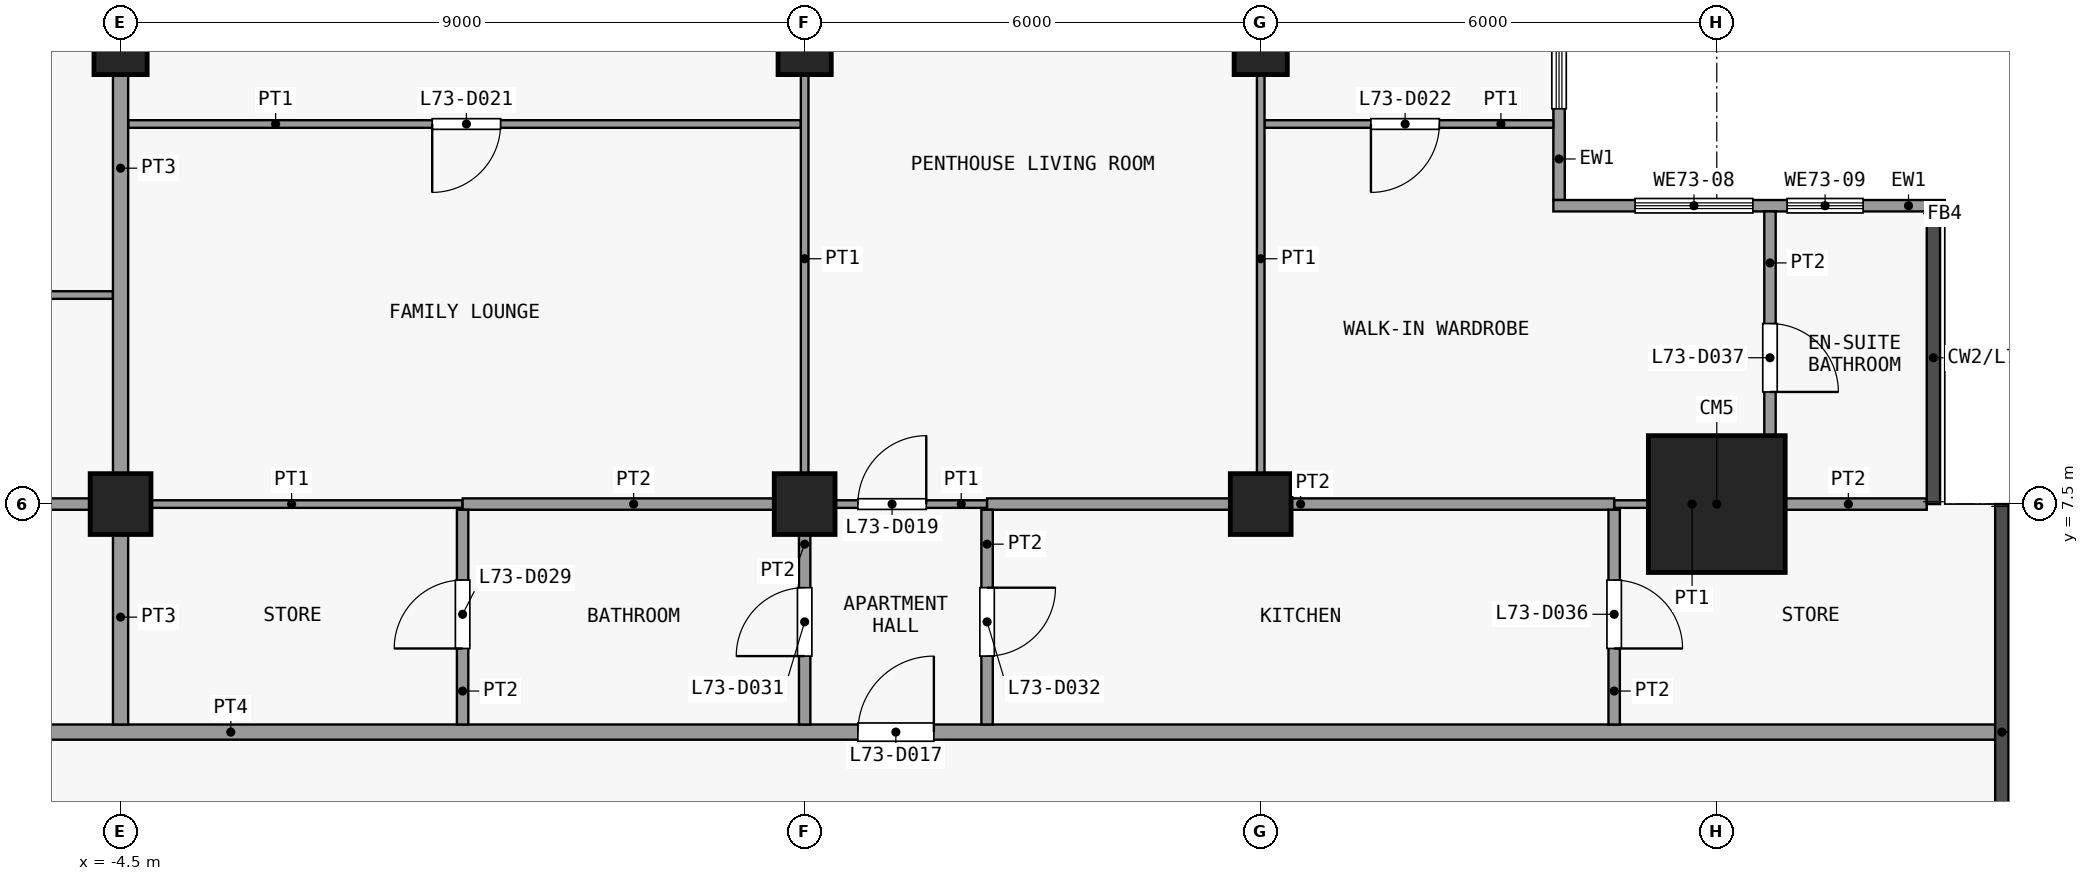
"""IFC4 building model, lengths in metres.
Left out: names, types, materials, properties, quantities, classifications, styles, units other than length and angle.
Written with IfcOpenShell. Run it as: python <this file> out.ifc"""

import sys

from ifc_helpers import new_model, si_unit, direction, frame, frame_2d, origin, origin_2d, place, context, subcontext, project, spatial, rectangle, extrude, element, fill, save


model = new_model("IFC4")
c1 = context("Model", 3, precision=1e-05, world=origin(), true_north=direction((0.0, 1.0)))
c2 = subcontext(c1, "Body", "Model", "MODEL_VIEW")
j1 = project(units=[si_unit("LENGTHUNIT", "METRE"), si_unit("PLANEANGLEUNIT", "RADIAN")], contexts=[c1])
p1 = place(None, origin())
s1 = spatial("IfcSite", under=j1, at=p1, CompositionType="ELEMENT")
p2 = place(p1, origin())
s2 = spatial("IfcBuilding", under=s1, at=p2, CompositionType="ELEMENT")
p3 = place(p2, frame((0.0, 0.0, 287.9)))
s3 = spatial("IfcBuildingStorey", under=s2, at=p3, CompositionType="ELEMENT", Elevation=287.9)
p4 = place(p3, frame((-4.5, 7.5, 0.0), z_axis=(0.0, 0.0, 1.0), x_axis=(1.0, 0.0, 0.0)))
e1 = element("IfcColumn", 1, at=p4, inside=s3, PredefinedType="COLUMN", context=c2, shape_type="SweptSolid", body=[
    extrude(rectangle(XDim=0.8, YDim=0.8, at=origin_2d()), origin(), (0.0, 0.0, 1.0), 3.6),
])
p5 = place(p3, frame((-4.5, 13.5, 0.0), z_axis=(0.0, 0.0, 1.0), x_axis=(1.0, 0.0, 0.0)))
e2 = element("IfcColumn", 2, at=p5, inside=s3, PredefinedType="COLUMN", context=c2, shape_type="SweptSolid", body=[
    extrude(rectangle(XDim=0.7, YDim=0.7, at=origin_2d()), origin(), (0.0, 0.0, 1.0), 3.6),
])
p6 = place(p3, frame((4.5, 7.5, 0.0), z_axis=(0.0, 0.0, 1.0), x_axis=(1.0, 0.0, 0.0)))
e3 = element("IfcColumn", 3, at=p6, inside=s3, PredefinedType="COLUMN", context=c2, shape_type="SweptSolid", body=[
    extrude(rectangle(XDim=0.8, YDim=0.8, at=origin_2d()), origin(), (0.0, 0.0, 1.0), 3.6),
])
p7 = place(p3, frame((4.5, 13.5, 0.0), z_axis=(0.0, 0.0, 1.0), x_axis=(1.0, 0.0, 0.0)))
e4 = element("IfcColumn", 4, at=p7, inside=s3, PredefinedType="COLUMN", context=c2, shape_type="SweptSolid", body=[
    extrude(rectangle(XDim=0.7, YDim=0.7, at=origin_2d()), origin(), (0.0, 0.0, 1.0), 3.6),
])
p8 = place(p3, frame((10.5, 7.5, 0.0), z_axis=(0.0, 0.0, 1.0), x_axis=(1.0, 0.0, 0.0)))
e5 = element("IfcColumn", 5, at=p8, inside=s3, PredefinedType="COLUMN", context=c2, shape_type="SweptSolid", body=[
    extrude(rectangle(XDim=0.8, YDim=0.8, at=origin_2d()), origin(), (0.0, 0.0, 1.0), 3.6),
])
p9 = place(p3, frame((10.5, 13.5, 0.0), z_axis=(0.0, 0.0, 1.0), x_axis=(1.0, 0.0, 0.0)))
e6 = element("IfcColumn", 6, at=p9, inside=s3, PredefinedType="COLUMN", context=c2, shape_type="SweptSolid", body=[
    extrude(rectangle(XDim=0.7, YDim=0.7, at=origin_2d()), origin(), (0.0, 0.0, 1.0), 3.6),
])
p10 = place(p3, frame((16.5, 7.5, 0.0), z_axis=(0.0, 0.0, 1.0), x_axis=(1.0, 0.0, 0.0)))
e7 = element("IfcColumn", 7, at=p10, inside=s3, PredefinedType="COLUMN", context=c2, shape_type="SweptSolid", body=[
    extrude(rectangle(XDim=1.8, YDim=1.8, at=origin_2d()), origin(), (0.0, 0.0, 1.0), 3.6),
])
p11 = place(p3, frame((14.425, 16.262, 0.0), z_axis=(0.0, 0.0, 1.0), x_axis=(0.0, -1.0, 0.0)))
e8 = element("IfcWall", 8, at=p11, inside=s3, PredefinedType="SOLIDWALL", context=c2, shape_type="SweptSolid", body=[
    extrude(rectangle(XDim=4.762, YDim=0.15, at=frame_2d((2.381, 0.0))), origin(), (0.0, 0.0, 1.0), 3.3),
])
p12 = place(p11, frame((0.881, 0.0, 0.9)))
e9 = element("IfcOpeningElement", 9, at=p12, cuts=e8, PredefinedType="OPENING", context=c2, shape_type="SweptSolid", body=[
    extrude(rectangle(XDim=2.681, YDim=2.4, at=frame_2d((1.34, 1.2))), frame((0.0, 0.085, 0.0), z_axis=(0.0, -1.0, 0.0), x_axis=(1.0, 0.0, 0.0)), (0.0, 0.0, 1.0), 0.17),
])
p13 = place(p3, frame((14.35, 11.425, 0.0), z_axis=(0.0, 0.0, 1.0), x_axis=(1.0, 0.0, 0.0)))
e10 = element("IfcWall", 10, at=p13, inside=s3, PredefinedType="SOLIDWALL", context=c2, shape_type="SweptSolid", body=[
    extrude(rectangle(XDim=5.15, YDim=0.15, at=frame_2d((2.575, 0.0))), origin(), (0.0, 0.0, 1.0), 3.3),
])
p14 = place(p13, frame((1.075, 0.0, 0.9)))
e11 = element("IfcOpeningElement", 11, at=p14, cuts=e10, PredefinedType="OPENING", context=c2, shape_type="SweptSolid", body=[
    extrude(rectangle(XDim=1.55, YDim=2.4, at=frame_2d((0.775, 1.2))), frame((0.0, 0.085, 0.0), z_axis=(0.0, -1.0, 0.0), x_axis=(1.0, 0.0, 0.0)), (0.0, 0.0, 1.0), 0.17),
])
p15 = place(p13, frame((3.075, 0.0, 0.9)))
e12 = element("IfcOpeningElement", 12, at=p15, cuts=e10, PredefinedType="OPENING", context=c2, shape_type="SweptSolid", body=[
    extrude(rectangle(XDim=1.0, YDim=2.4, at=frame_2d((0.5, 1.2))), frame((0.0, 0.085, 0.0), z_axis=(0.0, -1.0, 0.0), x_axis=(1.0, 0.0, 0.0)), (0.0, 0.0, 1.0), 0.17),
])
p16 = place(p3, frame((-19.35, 4.5, 0.0), z_axis=(0.0, 0.0, 1.0), x_axis=(1.0, 0.0, 0.0)))
e13 = element("IfcWall", 13, at=p16, inside=s3, PredefinedType="PARTITIONING", context=c2, shape_type="SweptSolid", body=[
    extrude(rectangle(XDim=39.6, YDim=0.2, at=frame_2d((19.8, 0.0))), origin(), (0.0, 0.0, 1.0), 3.3),
])
p17 = place(p16, frame((7.05, 0.0, 0.0)))
e14 = element("IfcOpeningElement", 14, at=p17, cuts=e13, PredefinedType="OPENING", context=c2, shape_type="SweptSolid", body=[
    extrude(rectangle(XDim=1.0, YDim=2.1, at=frame_2d((0.5, 1.05))), frame((0.0, 0.11, 0.0), z_axis=(0.0, -1.0, 0.0), x_axis=(1.0, 0.0, 0.0)), (0.0, 0.0, 1.0), 0.22),
])
p18 = place(p16, frame((24.55, 0.0, 0.0)))
e15 = element("IfcOpeningElement", 15, at=p18, cuts=e13, PredefinedType="OPENING", context=c2, shape_type="SweptSolid", body=[
    extrude(rectangle(XDim=1.0, YDim=2.1, at=frame_2d((0.5, 1.05))), frame((0.0, 0.11, 0.0), z_axis=(0.0, -1.0, 0.0), x_axis=(1.0, 0.0, 0.0)), (0.0, 0.0, 1.0), 0.22),
])
p19 = place(p3, frame((-4.5, 7.5, 0.0), z_axis=(0.0, 0.0, 1.0), x_axis=(1.0, 0.0, 0.0)))
e16 = element("IfcWall", 16, at=p19, inside=s3, PredefinedType="PARTITIONING", context=c2, shape_type="SweptSolid", body=[
    extrude(rectangle(XDim=4.5, YDim=0.1, at=frame_2d((2.25, 0.0))), origin(), (0.0, 0.0, 1.0), 3.3),
])
p20 = place(p3, frame((4.5, 7.5, 0.0), z_axis=(0.0, 0.0, 1.0), x_axis=(1.0, 0.0, 0.0)))
e17 = element("IfcWall", 17, at=p20, inside=s3, PredefinedType="PARTITIONING", context=c2, shape_type="SweptSolid", body=[
    extrude(rectangle(XDim=2.4, YDim=0.1, at=frame_2d((1.2, 0.0))), origin(), (0.0, 0.0, 1.0), 3.3),
])
p21 = place(p20, frame((0.7, 0.0, 0.0)))
e18 = element("IfcOpeningElement", 18, at=p21, cuts=e17, PredefinedType="OPENING", context=c2, shape_type="SweptSolid", body=[
    extrude(rectangle(XDim=0.9, YDim=2.1, at=frame_2d((0.45, 1.05))), frame((0.0, 0.06, 0.0), z_axis=(0.0, -1.0, 0.0), x_axis=(1.0, 0.0, 0.0)), (0.0, 0.0, 1.0), 0.12),
])
p22 = place(p3, frame((15.15, 7.5, 0.0), z_axis=(0.0, 0.0, 1.0), x_axis=(1.0, 0.0, 0.0)))
e19 = element("IfcWall", 19, at=p22, inside=s3, PredefinedType="PARTITIONING", context=c2, shape_type="SweptSolid", body=[
    extrude(rectangle(XDim=2.05, YDim=0.1, at=frame_2d((1.025, 0.0))), origin(), (0.0, 0.0, 1.0), 3.3),
])
p23 = place(p3, frame((-10.5, 7.5, 0.0), z_axis=(0.0, 0.0, 1.0), x_axis=(1.0, 0.0, 0.0)))
e20 = element("IfcWall", 20, at=p23, inside=s3, PredefinedType="PARTITIONING", context=c2, shape_type="SweptSolid", body=[
    extrude(rectangle(XDim=6.0, YDim=0.15, at=frame_2d((3.0, 0.0))), origin(), (0.0, 0.0, 1.0), 3.3),
])
p24 = place(p3, frame((0.0, 7.5, 0.0), z_axis=(0.0, 0.0, 1.0), x_axis=(1.0, 0.0, 0.0)))
e21 = element("IfcWall", 21, at=p24, inside=s3, PredefinedType="PARTITIONING", context=c2, shape_type="SweptSolid", body=[
    extrude(rectangle(XDim=4.5, YDim=0.15, at=frame_2d((2.25, 0.0))), origin(), (0.0, 0.0, 1.0), 3.3),
])
p25 = place(p3, frame((6.9, 7.5, 0.0), z_axis=(0.0, 0.0, 1.0), x_axis=(1.0, 0.0, 0.0)))
e22 = element("IfcWall", 22, at=p25, inside=s3, PredefinedType="PARTITIONING", context=c2, shape_type="SweptSolid", body=[
    extrude(rectangle(XDim=8.25, YDim=0.15, at=frame_2d((4.125, 0.0))), origin(), (0.0, 0.0, 1.0), 3.3),
])
p26 = place(p3, frame((17.2, 7.5, 0.0), z_axis=(0.0, 0.0, 1.0), x_axis=(1.0, 0.0, 0.0)))
e23 = element("IfcWall", 23, at=p26, inside=s3, PredefinedType="PARTITIONING", context=c2, shape_type="SweptSolid", body=[
    extrude(rectangle(XDim=2.062, YDim=0.15, at=frame_2d((1.031, 0.0))), origin(), (0.0, 0.0, 1.0), 3.3),
])
p27 = place(p3, frame((-10.45, 10.25, 0.0), z_axis=(0.0, 0.0, 1.0), x_axis=(1.0, 0.0, 0.0)))
e24 = element("IfcWall", 24, at=p27, inside=s3, PredefinedType="PARTITIONING", context=c2, shape_type="SweptSolid", body=[
    extrude(rectangle(XDim=5.85, YDim=0.1, at=frame_2d((2.925, 0.0))), origin(), (0.0, 0.0, 1.0), 3.3),
])
p28 = place(p27, frame((2.5, 0.0, 0.0)))
e25 = element("IfcOpeningElement", 25, at=p28, cuts=e24, PredefinedType="OPENING", context=c2, shape_type="SweptSolid", body=[
    extrude(rectangle(XDim=0.9, YDim=2.1, at=frame_2d((0.45, 1.05))), frame((0.0, 0.06, 0.0), z_axis=(0.0, -1.0, 0.0), x_axis=(1.0, 0.0, 0.0)), (0.0, 0.0, 1.0), 0.12),
])
p29 = place(p3, frame((-4.4, 12.5, 0.0), z_axis=(0.0, 0.0, 1.0), x_axis=(1.0, 0.0, 0.0)))
e26 = element("IfcWall", 26, at=p29, inside=s3, PredefinedType="PARTITIONING", context=c2, shape_type="SweptSolid", body=[
    extrude(rectangle(XDim=8.85, YDim=0.1, at=frame_2d((4.425, 0.0))), origin(), (0.0, 0.0, 1.0), 3.3),
])
p30 = place(p29, frame((4.0, 0.0, 0.0)))
e27 = element("IfcOpeningElement", 27, at=p30, cuts=e26, PredefinedType="OPENING", context=c2, shape_type="SweptSolid", body=[
    extrude(rectangle(XDim=0.9, YDim=2.1, at=frame_2d((0.45, 1.05))), frame((0.0, 0.06, 0.0), z_axis=(0.0, -1.0, 0.0), x_axis=(1.0, 0.0, 0.0)), (0.0, 0.0, 1.0), 0.12),
])
p31 = place(p3, frame((10.55, 12.5, 0.0), z_axis=(0.0, 0.0, 1.0), x_axis=(1.0, 0.0, 0.0)))
e28 = element("IfcWall", 28, at=p31, inside=s3, PredefinedType="PARTITIONING", context=c2, shape_type="SweptSolid", body=[
    extrude(rectangle(XDim=3.8, YDim=0.1, at=frame_2d((1.9, 0.0))), origin(), (0.0, 0.0, 1.0), 3.3),
])
p32 = place(p31, frame((1.4, 0.0, 0.0)))
e29 = element("IfcOpeningElement", 29, at=p32, cuts=e28, PredefinedType="OPENING", context=c2, shape_type="SweptSolid", body=[
    extrude(rectangle(XDim=0.9, YDim=2.1, at=frame_2d((0.45, 1.05))), frame((0.0, 0.06, 0.0), z_axis=(0.0, -1.0, 0.0), x_axis=(1.0, 0.0, 0.0)), (0.0, 0.0, 1.0), 0.12),
])
p33 = place(p3, frame((-4.5, 4.6, 0.0), z_axis=(0.0, 0.0, 1.0), x_axis=(0.0, 1.0, 0.0)))
e30 = element("IfcWall", 30, at=p33, inside=s3, PredefinedType="PARTITIONING", context=c2, shape_type="SweptSolid", body=[
    extrude(rectangle(XDim=2.825, YDim=0.2, at=frame_2d((1.413, 0.0))), origin(), (0.0, 0.0, 1.0), 3.3),
])
p34 = place(p3, frame((-4.5, 7.575, 0.0), z_axis=(0.0, 0.0, 1.0), x_axis=(0.0, 1.0, 0.0)))
e31 = element("IfcWall", 31, at=p34, inside=s3, PredefinedType="PARTITIONING", context=c2, shape_type="SweptSolid", body=[
    extrude(rectangle(XDim=8.688, YDim=0.2, at=frame_2d((4.344, 0.0))), origin(), (0.0, 0.0, 1.0), 3.3),
])
p35 = place(p3, frame((0.0, 4.6, 0.0), z_axis=(0.0, 0.0, 1.0), x_axis=(0.0, 1.0, 0.0)))
e32 = element("IfcWall", 32, at=p35, inside=s3, PredefinedType="PARTITIONING", context=c2, shape_type="SweptSolid", body=[
    extrude(rectangle(XDim=2.825, YDim=0.15, at=frame_2d((1.413, 0.0))), origin(), (0.0, 0.0, 1.0), 3.3),
])
p36 = place(p35, frame((1.0, 0.0, 0.0)))
e33 = element("IfcOpeningElement", 33, at=p36, cuts=e32, PredefinedType="OPENING", context=c2, shape_type="SweptSolid", body=[
    extrude(rectangle(XDim=0.9, YDim=2.1, at=frame_2d((0.45, 1.05))), frame((0.0, 0.085, 0.0), z_axis=(0.0, -1.0, 0.0), x_axis=(1.0, 0.0, 0.0)), (0.0, 0.0, 1.0), 0.17),
])
p37 = place(p3, frame((4.5, 7.575, 0.0), z_axis=(0.0, 0.0, 1.0), x_axis=(0.0, 1.0, 0.0)))
e34 = element("IfcWall", 34, at=p37, inside=s3, PredefinedType="PARTITIONING", context=c2, shape_type="SweptSolid", body=[
    extrude(rectangle(XDim=8.688, YDim=0.1, at=frame_2d((4.344, 0.0))), origin(), (0.0, 0.0, 1.0), 3.3),
])
p38 = place(p37, frame((6.425, 0.0, 0.0)))
e35 = element("IfcOpeningElement", 35, at=p38, cuts=e34, PredefinedType="OPENING", context=c2, shape_type="SweptSolid", body=[
    extrude(rectangle(XDim=0.9, YDim=2.1, at=frame_2d((0.45, 1.05))), frame((0.0, 0.06, 0.0), z_axis=(0.0, -1.0, 0.0), x_axis=(1.0, 0.0, 0.0)), (0.0, 0.0, 1.0), 0.12),
])
p39 = place(p3, frame((4.5, 4.6, 0.0), z_axis=(0.0, 0.0, 1.0), x_axis=(0.0, 1.0, 0.0)))
e36 = element("IfcWall", 36, at=p39, inside=s3, PredefinedType="PARTITIONING", context=c2, shape_type="SweptSolid", body=[
    extrude(rectangle(XDim=2.825, YDim=0.15, at=frame_2d((1.413, 0.0))), origin(), (0.0, 0.0, 1.0), 3.3),
])
p40 = place(p39, frame((0.9, 0.0, 0.0)))
e37 = element("IfcOpeningElement", 37, at=p40, cuts=e36, PredefinedType="OPENING", context=c2, shape_type="SweptSolid", body=[
    extrude(rectangle(XDim=0.9, YDim=2.1, at=frame_2d((0.45, 1.05))), frame((0.0, 0.085, 0.0), z_axis=(0.0, -1.0, 0.0), x_axis=(1.0, 0.0, 0.0)), (0.0, 0.0, 1.0), 0.17),
])
p41 = place(p3, frame((6.9, 4.6, 0.0), z_axis=(0.0, 0.0, 1.0), x_axis=(0.0, 1.0, 0.0)))
e38 = element("IfcWall", 38, at=p41, inside=s3, PredefinedType="PARTITIONING", context=c2, shape_type="SweptSolid", body=[
    extrude(rectangle(XDim=2.825, YDim=0.15, at=frame_2d((1.413, 0.0))), origin(), (0.0, 0.0, 1.0), 3.3),
])
p42 = place(p41, frame((0.9, 0.0, 0.0)))
e39 = element("IfcOpeningElement", 39, at=p42, cuts=e38, PredefinedType="OPENING", context=c2, shape_type="SweptSolid", body=[
    extrude(rectangle(XDim=0.9, YDim=2.1, at=frame_2d((0.45, 1.05))), frame((0.0, 0.085, 0.0), z_axis=(0.0, -1.0, 0.0), x_axis=(1.0, 0.0, 0.0)), (0.0, 0.0, 1.0), 0.17),
])
p43 = place(p3, frame((10.5, 7.575, 0.0), z_axis=(0.0, 0.0, 1.0), x_axis=(0.0, 1.0, 0.0)))
e40 = element("IfcWall", 40, at=p43, inside=s3, PredefinedType="PARTITIONING", context=c2, shape_type="SweptSolid", body=[
    extrude(rectangle(XDim=8.688, YDim=0.1, at=frame_2d((4.344, 0.0))), origin(), (0.0, 0.0, 1.0), 3.3),
])
p44 = place(p43, frame((6.425, 0.0, 0.0)))
e41 = element("IfcOpeningElement", 41, at=p44, cuts=e40, PredefinedType="OPENING", context=c2, shape_type="SweptSolid", body=[
    extrude(rectangle(XDim=0.9, YDim=2.1, at=frame_2d((0.45, 1.05))), frame((0.0, 0.06, 0.0), z_axis=(0.0, -1.0, 0.0), x_axis=(1.0, 0.0, 0.0)), (0.0, 0.0, 1.0), 0.12),
])
p45 = place(p3, frame((15.15, 4.6, 0.0), z_axis=(0.0, 0.0, 1.0), x_axis=(0.0, 1.0, 0.0)))
e42 = element("IfcWall", 42, at=p45, inside=s3, PredefinedType="PARTITIONING", context=c2, shape_type="SweptSolid", body=[
    extrude(rectangle(XDim=2.825, YDim=0.15, at=frame_2d((1.413, 0.0))), origin(), (0.0, 0.0, 1.0), 3.3),
])
p46 = place(p45, frame((1.0, 0.0, 0.0)))
e43 = element("IfcOpeningElement", 43, at=p46, cuts=e42, PredefinedType="OPENING", context=c2, shape_type="SweptSolid", body=[
    extrude(rectangle(XDim=0.9, YDim=2.1, at=frame_2d((0.45, 1.05))), frame((0.0, 0.085, 0.0), z_axis=(0.0, -1.0, 0.0), x_axis=(1.0, 0.0, 0.0)), (0.0, 0.0, 1.0), 0.17),
])
p47 = place(p3, frame((17.2, 7.575, 0.0), z_axis=(0.0, 0.0, 1.0), x_axis=(0.0, 1.0, 0.0)))
e44 = element("IfcWall", 44, at=p47, inside=s3, PredefinedType="PARTITIONING", context=c2, shape_type="SweptSolid", body=[
    extrude(rectangle(XDim=3.775, YDim=0.15, at=frame_2d((1.888, 0.0))), origin(), (0.0, 0.0, 1.0), 3.3),
])
p48 = place(p47, frame((1.4, 0.0, 0.0)))
e45 = element("IfcOpeningElement", 45, at=p48, cuts=e44, PredefinedType="OPENING", context=c2, shape_type="SweptSolid", body=[
    extrude(rectangle(XDim=0.9, YDim=2.1, at=frame_2d((0.45, 1.05))), frame((0.0, 0.085, 0.0), z_axis=(0.0, -1.0, 0.0), x_axis=(1.0, 0.0, 0.0)), (0.0, 0.0, 1.0), 0.17),
])
p49 = place(p12, origin())
e46 = element("IfcWindow", 46, at=p49, inside=s3, PartitioningType="SINGLE_PANEL", PredefinedType="WINDOW", context=c2, shape_type="SweptSolid", body=[
    extrude(rectangle(XDim=2.681, YDim=2.4, at=frame_2d((1.34, 1.2))), frame((0.0, 0.03, 0.0), z_axis=(0.0, -1.0, 0.0), x_axis=(1.0, 0.0, 0.0)), (0.0, 0.0, 1.0), 0.06),
])
fill(e9, e46)
p50 = place(p14, origin())
e47 = element("IfcWindow", 47, at=p50, inside=s3, PartitioningType="SINGLE_PANEL", PredefinedType="WINDOW", context=c2, shape_type="SweptSolid", body=[
    extrude(rectangle(XDim=1.55, YDim=2.4, at=frame_2d((0.775, 1.2))), frame((0.0, 0.03, 0.0), z_axis=(0.0, -1.0, 0.0), x_axis=(1.0, 0.0, 0.0)), (0.0, 0.0, 1.0), 0.06),
])
fill(e11, e47)
p51 = place(p15, origin())
e48 = element("IfcWindow", 48, at=p51, inside=s3, PartitioningType="SINGLE_PANEL", PredefinedType="WINDOW", context=c2, shape_type="SweptSolid", body=[
    extrude(rectangle(XDim=1.0, YDim=2.4, at=frame_2d((0.5, 1.2))), frame((0.0, 0.03, 0.0), z_axis=(0.0, -1.0, 0.0), x_axis=(1.0, 0.0, 0.0)), (0.0, 0.0, 1.0), 0.06),
])
fill(e12, e48)
p52 = place(p18, origin())
e49 = element("IfcDoor", 49, at=p52, inside=s3, OperationType="SINGLE_SWING_LEFT", PredefinedType="DOOR", context=c2, shape_type="SweptSolid", body=[
    extrude(rectangle(XDim=1.0, YDim=2.1, at=frame_2d((0.5, 1.05))), frame((0.0, 0.025, 0.0), z_axis=(0.0, -1.0, 0.0), x_axis=(1.0, 0.0, 0.0)), (0.0, 0.0, 1.0), 0.05),
])
fill(e15, e49)
p53 = place(p21, origin())
e50 = element("IfcDoor", 50, at=p53, inside=s3, OperationType="SINGLE_SWING_LEFT", PredefinedType="DOOR", context=c2, shape_type="SweptSolid", body=[
    extrude(rectangle(XDim=0.9, YDim=2.1, at=frame_2d((0.45, 1.05))), frame((0.0, 0.025, 0.0), z_axis=(0.0, -1.0, 0.0), x_axis=(1.0, 0.0, 0.0)), (0.0, 0.0, 1.0), 0.05),
])
fill(e18, e50)
p54 = place(p30, origin())
e51 = element("IfcDoor", 51, at=p54, inside=s3, OperationType="SINGLE_SWING_LEFT", PredefinedType="DOOR", context=c2, shape_type="SweptSolid", body=[
    extrude(rectangle(XDim=0.9, YDim=2.1, at=frame_2d((0.45, 1.05))), frame((0.0, 0.025, 0.0), z_axis=(0.0, -1.0, 0.0), x_axis=(1.0, 0.0, 0.0)), (0.0, 0.0, 1.0), 0.05),
])
fill(e27, e51)
p55 = place(p32, origin())
e52 = element("IfcDoor", 52, at=p55, inside=s3, OperationType="SINGLE_SWING_LEFT", PredefinedType="DOOR", context=c2, shape_type="SweptSolid", body=[
    extrude(rectangle(XDim=0.9, YDim=2.1, at=frame_2d((0.45, 1.05))), frame((0.0, 0.025, 0.0), z_axis=(0.0, -1.0, 0.0), x_axis=(1.0, 0.0, 0.0)), (0.0, 0.0, 1.0), 0.05),
])
fill(e29, e52)
p56 = place(p36, origin())
e53 = element("IfcDoor", 53, at=p56, inside=s3, OperationType="SINGLE_SWING_RIGHT", PredefinedType="DOOR", context=c2, shape_type="SweptSolid", body=[
    extrude(rectangle(XDim=0.9, YDim=2.1, at=frame_2d((0.45, 1.05))), frame((0.0, 0.025, 0.0), z_axis=(0.0, -1.0, 0.0), x_axis=(1.0, 0.0, 0.0)), (0.0, 0.0, 1.0), 0.05),
])
fill(e33, e53)
p57 = place(p40, origin())
e54 = element("IfcDoor", 54, at=p57, inside=s3, OperationType="SINGLE_SWING_RIGHT", PredefinedType="DOOR", context=c2, shape_type="SweptSolid", body=[
    extrude(rectangle(XDim=0.9, YDim=2.1, at=frame_2d((0.45, 1.05))), frame((0.0, 0.025, 0.0), z_axis=(0.0, -1.0, 0.0), x_axis=(1.0, 0.0, 0.0)), (0.0, 0.0, 1.0), 0.05),
])
fill(e37, e54)
p58 = place(p42, origin())
e55 = element("IfcDoor", 55, at=p58, inside=s3, OperationType="SINGLE_SWING_RIGHT", PredefinedType="DOOR", context=c2, shape_type="SweptSolid", body=[
    extrude(rectangle(XDim=0.9, YDim=2.1, at=frame_2d((0.45, 1.05))), frame((0.0, 0.025, 0.0), z_axis=(0.0, -1.0, 0.0), x_axis=(1.0, 0.0, 0.0)), (0.0, 0.0, 1.0), 0.05),
])
fill(e39, e55)
p59 = place(p46, origin())
e56 = element("IfcDoor", 56, at=p59, inside=s3, OperationType="SINGLE_SWING_LEFT", PredefinedType="DOOR", context=c2, shape_type="SweptSolid", body=[
    extrude(rectangle(XDim=0.9, YDim=2.1, at=frame_2d((0.45, 1.05))), frame((0.0, 0.025, 0.0), z_axis=(0.0, -1.0, 0.0), x_axis=(1.0, 0.0, 0.0)), (0.0, 0.0, 1.0), 0.05),
])
fill(e43, e56)
p60 = place(p48, origin())
e57 = element("IfcDoor", 57, at=p60, inside=s3, OperationType="SINGLE_SWING_LEFT", PredefinedType="DOOR", context=c2, shape_type="SweptSolid", body=[
    extrude(rectangle(XDim=0.9, YDim=2.1, at=frame_2d((0.45, 1.05))), frame((0.0, 0.025, 0.0), z_axis=(0.0, -1.0, 0.0), x_axis=(1.0, 0.0, 0.0)), (0.0, 0.0, 1.0), 0.05),
])
fill(e45, e57)
save(model, sys.argv[1])
